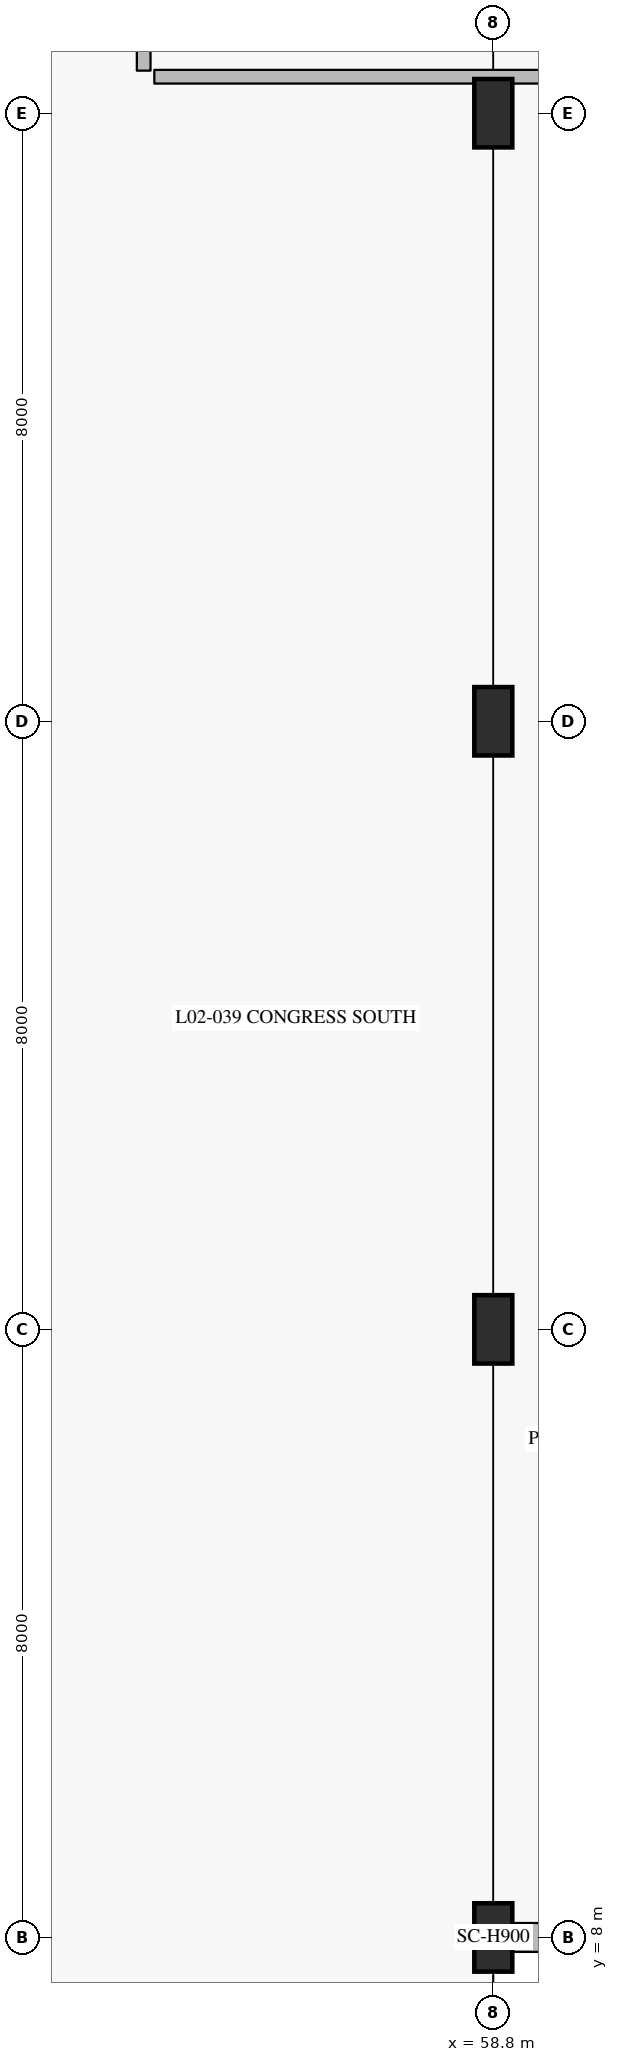
"""IFC4 building model, lengths in metres.
Left out: names, types, materials, properties, quantities, classifications, styles, units other than length and angle.
Written with IfcOpenShell. Run it as: python <this file> out.ifc"""

import sys

from ifc_helpers import new_model, si_unit, direction, frame, frame_2d, origin, origin_2d, place, context, subcontext, project, spatial, rectangle, hollow_rectangle, extrude, element, save


model = new_model("IFC4")
c1 = context("Model", 3, precision=1e-05, world=origin(), true_north=direction((0.0, 1.0)))
c2 = subcontext(c1, "Body", "Model", "MODEL_VIEW")
j1 = project(units=[si_unit("LENGTHUNIT", "METRE"), si_unit("PLANEANGLEUNIT", "RADIAN")], contexts=[c1])
p1 = place(None, origin())
s1 = spatial("IfcSite", under=j1, at=p1, CompositionType="ELEMENT")
p2 = place(p1, origin())
s2 = spatial("IfcBuilding", under=s1, at=p2, CompositionType="ELEMENT")
p3 = place(p2, frame((0.0, 0.0, 11.4)))
s3 = spatial("IfcBuildingStorey", under=s2, at=p3, CompositionType="ELEMENT", Elevation=11.4)
for number, where, z_axis, x_axis in (
    (1, (58.8, 8.0, 0.0), (0.0, 0.0, 1.0), (1.0, 0.0, 0.0)),
    (2, (58.8, 16.0, 0.0), (0.0, 0.0, 1.0), (1.0, 0.0, 0.0)),
    (3, (58.8, 24.0, 0.0), (0.0, 0.0, 1.0), (1.0, 0.0, 0.0)),
    (4, (58.8, 32.0, 0.0), (0.0, 0.0, 1.0), (1.0, 0.0, 0.0)),
):
    element("IfcColumn", number, at=place(p3, frame(where, z_axis=z_axis, x_axis=x_axis)), inside=s3, PredefinedType="COLUMN", context=c2, shape_type="SweptSolid", body=[
        extrude(hollow_rectangle(XDim=0.5, YDim=0.9, WallThickness=0.024, at=origin_2d()), origin(), (0.0, 0.0, 1.0), 4.8),
    ])
p4 = place(p3, frame((66.85, 8.0, 0.0), z_axis=(0.0, 0.0, 1.0), x_axis=(-1.0, 0.0, 0.0)))
e5 = element("IfcWall", 5, at=p4, inside=s3, PredefinedType="SOLIDWALL", context=c2, shape_type="SweptSolid", body=[
    extrude(rectangle(XDim=7.8, YDim=0.38, at=frame_2d((3.9, 0.0))), origin(), (0.0, 0.0, 1.0), 3.84),
])
p5 = place(p4, frame((2.45, 0.0, 0.95)))
e6 = element("IfcOpeningElement", 6, at=p5, cuts=e5, PredefinedType="OPENING", context=c2, shape_type="SweptSolid", body=[
    extrude(rectangle(XDim=2.9, YDim=1.75, at=frame_2d((1.45, 0.875))), frame((0.0, 0.2, 0.0), z_axis=(0.0, -1.0, 0.0), x_axis=(1.0, 0.0, 0.0)), (0.0, 0.0, 1.0), 0.4),
])
p6 = place(p3, frame((54.2, 32.56, 0.0), z_axis=(0.0, 0.0, 1.0), x_axis=(0.0, 1.0, 0.0)))
e7 = element("IfcWall", 7, at=p6, inside=s3, PredefinedType="PARTITIONING", context=c2, shape_type="SweptSolid", body=[
    extrude(rectangle(XDim=11.08, YDim=0.18, at=frame_2d((5.54, 0.0))), origin(), (0.0, 0.0, 1.0), 4.535),
])
p7 = place(p6, frame((4.69, 0.0, 0.0)))
e8 = element("IfcOpeningElement", 8, at=p7, cuts=e7, PredefinedType="OPENING", context=c2, shape_type="SweptSolid", body=[
    extrude(rectangle(XDim=1.7, YDim=2.3, at=frame_2d((0.85, 1.15))), frame((0.0, 0.1, 0.0), z_axis=(0.0, -1.0, 0.0), x_axis=(1.0, 0.0, 0.0)), (0.0, 0.0, 1.0), 0.2),
])
p8 = place(p3, frame((54.34, 32.48, 0.0), z_axis=(0.0, 0.0, 1.0), x_axis=(1.0, 0.0, 0.0)))
e9 = element("IfcWall", 9, at=p8, inside=s3, PredefinedType="PARTITIONING", context=c2, shape_type="SweptSolid", body=[
    extrude(rectangle(XDim=11.61, YDim=0.18, at=frame_2d((5.805, 0.0))), origin(), (0.0, 0.0, 1.0), 4.535),
])
p9 = place(p8, frame((5.1, 0.0, 0.0)))
e10 = element("IfcOpeningElement", 10, at=p9, cuts=e9, PredefinedType="OPENING", context=c2, shape_type="SweptSolid", body=[
    extrude(rectangle(XDim=1.7, YDim=2.3, at=frame_2d((0.85, 1.15))), frame((0.0, 0.1, 0.0), z_axis=(0.0, -1.0, 0.0), x_axis=(1.0, 0.0, 0.0)), (0.0, 0.0, 1.0), 0.2),
])
save(model, sys.argv[1])
